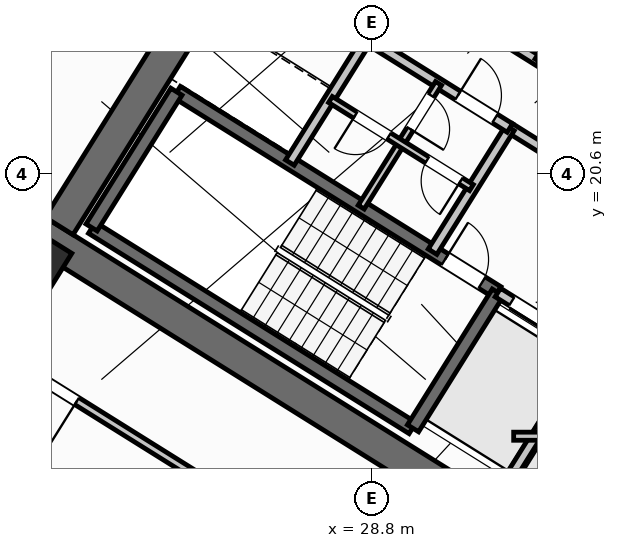
"""IFC4 building model, lengths in metres.
Left out: names, types, materials, properties, quantities, classifications, styles, units other than length and angle.
Written with IfcOpenShell. Run it as: python <this file> out.ifc"""

import sys

from ifc_helpers import new_model, si_unit, direction, frame, frame_2d, origin, origin_2d, place, context, subcontext, project, spatial, rectangle, hollow_rectangle, extrude, source, transform, mapped, element, fill, save


model = new_model("IFC4")
c1 = context("Model", 3, precision=1e-05, world=origin(), true_north=direction((0.0, 1.0)))
c2 = subcontext(c1, "Body", "Model", "MODEL_VIEW")
j1 = project(units=[si_unit("LENGTHUNIT", "METRE"), si_unit("PLANEANGLEUNIT", "RADIAN")], contexts=[c1])
p1 = place(None, origin())
s1 = spatial("IfcSite", under=j1, at=p1, CompositionType="ELEMENT")
p2 = place(p1, origin())
s2 = spatial("IfcBuilding", under=s1, at=p2, CompositionType="ELEMENT")
p3 = place(p2, frame((0.0, 0.0, 45.6)))
s3 = spatial("IfcBuildingStorey", under=s2, at=p3, CompositionType="ELEMENT", Elevation=45.6)
p4 = place(p3, frame((33.409, 12.45, 0.0), z_axis=(0.0, 0.0, 1.0), x_axis=(-0.848051132073, 0.529914405721, 0.0)))
e1 = element("IfcWall", 1, at=p4, inside=s3, PredefinedType="SHEAR", context=c2, shape_type="SweptSolid", body=[
    extrude(rectangle(XDim=13.24, YDim=0.65, at=frame_2d((6.62, 0.0))), origin(), (0.0, 0.0, 1.0), 3.35),
])
p5 = place(p3, frame((26.007, 24.976, 0.0), z_axis=(0.0, 0.0, 1.0), x_axis=(-0.529916319127, -0.848049936456, 0.0)))
e2 = element("IfcWall", 2, at=p5, inside=s3, PredefinedType="SHEAR", context=c2, shape_type="SweptSolid", body=[
    extrude(rectangle(XDim=6.375, YDim=0.65, at=frame_2d((3.188, 0.0))), origin(), (0.0, 0.0, 1.0), 3.35),
])
m1 = source(origin(), c2, "Body", "SweptSolid", [
    extrude(hollow_rectangle(XDim=1.0, YDim=1.0, WallThickness=0.04, at=origin_2d()), origin(), (0.0, 0.0, 1.0), 3.6),
])
p6 = place(p3, frame((22.191, 18.87, 0.0), z_axis=(0.0, 0.0, 1.0), x_axis=(-0.848048096156, 0.529919264233, 0.0)))
e3 = element("IfcColumn", 3, at=p6, inside=s3, PredefinedType="COLUMN", context=c2, shape_type="MappedRepresentation", body=[
    mapped(m1, transform((0.0, 0.0, 0.0), scale=1.0)),
])
p7 = place(p3, frame((29.268, 6.429, 0.0), z_axis=(0.0, 0.0, 1.0), x_axis=(-0.848049971435, 0.529916263149, 0.0)))
e4 = element("IfcWall", 4, at=p7, inside=s3, PredefinedType="STANDARD", context=c2, shape_type="SweptSolid", body=[
    extrude(rectangle(XDim=31.588, YDim=0.32, at=frame_2d((15.794, 0.0))), origin(), (0.0, 0.0, 1.0), 3.35),
])
p8 = place(p7, frame((16.362, 0.0, 0.0)))
e5 = element("IfcOpeningElement", 5, at=p8, cuts=e4, PredefinedType="OPENING", context=c2, shape_type="SweptSolid", body=[
    extrude(rectangle(XDim=1.2, YDim=2.15, at=frame_2d((0.6, 1.075))), frame((0.0, 0.17, 0.0), z_axis=(0.0, -1.0, 0.0), x_axis=(1.0, 0.0, 0.0)), (0.0, 0.0, 1.0), 0.34),
])
p9 = place(p7, frame((2.989, 0.0, 0.8)))
e6 = element("IfcOpeningElement", 6, at=p9, cuts=e4, PredefinedType="OPENING", context=c2, shape_type="SweptSolid", body=[
    extrude(rectangle(XDim=2.1, YDim=1.55, at=frame_2d((1.05, 0.775))), frame((0.0, 0.17, 0.0), z_axis=(0.0, -1.0, 0.0), x_axis=(1.0, 0.0, 0.0)), (0.0, 0.0, 1.0), 0.34),
])
p10 = place(p7, frame((8.359, 0.0, 0.8)))
e7 = element("IfcOpeningElement", 7, at=p10, cuts=e4, PredefinedType="OPENING", context=c2, shape_type="SweptSolid", body=[
    extrude(rectangle(XDim=2.1, YDim=1.55, at=frame_2d((1.05, 0.775))), frame((0.0, 0.17, 0.0), z_axis=(0.0, -1.0, 0.0), x_axis=(1.0, 0.0, 0.0)), (0.0, 0.0, 1.0), 0.34),
])
p11 = place(p7, frame((13.284, 0.0, 0.95)))
e8 = element("IfcOpeningElement", 8, at=p11, cuts=e4, PredefinedType="OPENING", context=c2, shape_type="SweptSolid", body=[
    extrude(rectangle(XDim=1.2, YDim=1.4, at=frame_2d((0.6, 0.7))), frame((0.0, 0.17, 0.0), z_axis=(0.0, -1.0, 0.0), x_axis=(1.0, 0.0, 0.0)), (0.0, 0.0, 1.0), 0.34),
])
p12 = place(p7, frame((20.259, 0.0, 0.95)))
e9 = element("IfcOpeningElement", 9, at=p12, cuts=e4, PredefinedType="OPENING", context=c2, shape_type="SweptSolid", body=[
    extrude(rectangle(XDim=1.2, YDim=1.4, at=frame_2d((0.6, 0.7))), frame((0.0, 0.17, 0.0), z_axis=(0.0, -1.0, 0.0), x_axis=(1.0, 0.0, 0.0)), (0.0, 0.0, 1.0), 0.34),
])
p13 = place(p7, frame((22.929, 0.0, 0.95)))
e10 = element("IfcOpeningElement", 10, at=p13, cuts=e4, PredefinedType="OPENING", context=c2, shape_type="SweptSolid", body=[
    extrude(rectangle(XDim=1.2, YDim=1.4, at=frame_2d((0.6, 0.7))), frame((0.0, 0.17, 0.0), z_axis=(0.0, -1.0, 0.0), x_axis=(1.0, 0.0, 0.0)), (0.0, 0.0, 1.0), 0.34),
])
p14 = place(p7, frame((26.106, 0.0, 0.85)))
e11 = element("IfcOpeningElement", 11, at=p14, cuts=e4, PredefinedType="OPENING", context=c2, shape_type="SweptSolid", body=[
    extrude(rectangle(XDim=1.5, YDim=1.5, at=frame_2d((0.75, 0.75))), frame((0.0, 0.17, 0.0), z_axis=(0.0, -1.0, 0.0), x_axis=(1.0, 0.0, 0.0)), (0.0, 0.0, 1.0), 0.34),
])
p15 = place(p7, frame((29.068, 0.0, 0.85)))
e12 = element("IfcOpeningElement", 12, at=p15, cuts=e4, PredefinedType="OPENING", context=c2, shape_type="SweptSolid", body=[
    extrude(rectangle(XDim=1.8, YDim=1.5, at=frame_2d((0.9, 0.75))), frame((0.0, 0.17, 0.0), z_axis=(0.0, -1.0, 0.0), x_axis=(1.0, 0.0, 0.0)), (0.0, 0.0, 1.0), 0.34),
])
p16 = place(p3, frame((29.605, 15.581, 0.0), z_axis=(0.0, 0.0, 1.0), x_axis=(-0.848036911448, 0.529937163087, 0.0)))
e13 = element("IfcWall", 13, at=p16, inside=s3, PredefinedType="SHEAR", context=c2, shape_type="SweptSolid", body=[
    extrude(rectangle(XDim=7.46, YDim=0.26, at=frame_2d((3.73, 0.0))), origin(), (0.0, 0.0, 1.0), 3.35),
])
p17 = place(p3, frame((31.28, 18.261, 0.0), z_axis=(0.0, 0.0, 1.0), x_axis=(-0.848051618787, 0.529913626805, 0.0)))
e14 = element("IfcWall", 14, at=p17, inside=s3, PredefinedType="SHEAR", context=c2, shape_type="SweptSolid", body=[
    extrude(rectangle(XDim=7.46, YDim=0.26, at=frame_2d((3.73, 0.0))), origin(), (0.0, 0.0, 1.0), 3.35),
])
p18 = place(p17, frame((0.36, 0.0, 0.0)))
e15 = element("IfcOpeningElement", 15, at=p18, cuts=e14, PredefinedType="OPENING", context=c2, shape_type="SweptSolid", body=[
    extrude(rectangle(XDim=0.86, YDim=2.05, at=frame_2d((0.43, 1.025))), frame((0.0, 0.14, 0.0), z_axis=(0.0, -1.0, 0.0), x_axis=(1.0, 0.0, 0.0)), (0.0, 0.0, 1.0), 0.28),
])
p19 = place(p3, frame((31.288, 18.256, 0.0), z_axis=(0.0, 0.0, 1.0), x_axis=(-0.529943379326, -0.848033026897, 0.0)))
e16 = element("IfcWall", 16, at=p19, inside=s3, PredefinedType="SHEAR", context=c2, shape_type="SweptSolid", body=[
    extrude(rectangle(XDim=3.16, YDim=0.26, at=frame_2d((1.58, 0.0))), origin(), (0.0, 0.0, 1.0), 3.35),
])
p20 = place(p3, frame((24.945, 22.22, 0.0), z_axis=(0.0, 0.0, 1.0), x_axis=(-0.529908658664, -0.84805472316, 0.0)))
e17 = element("IfcWall", 17, at=p20, inside=s3, PredefinedType="SHEAR", context=c2, shape_type="SweptSolid", body=[
    extrude(rectangle(XDim=3.16, YDim=0.26, at=frame_2d((1.58, 0.0))), origin(), (0.0, 0.0, 1.0), 3.35),
])
p21 = place(p3, frame((38.046, 21.108, 0.0), z_axis=(0.0, 0.0, 1.0), x_axis=(-0.848054434086, 0.529909121291, 0.0)))
e18 = element("IfcWall", 18, at=p21, inside=s3, PredefinedType="SHEAR", context=c2, shape_type="SweptSolid", body=[
    extrude(rectangle(XDim=7.33, YDim=0.26, at=frame_2d((3.665, 0.0))), origin(), (0.0, 0.0, 1.0), 3.35),
])
p22 = place(p21, frame((0.22, 0.0, 0.0)))
e19 = element("IfcOpeningElement", 19, at=p22, cuts=e18, PredefinedType="OPENING", context=c2, shape_type="SweptSolid", body=[
    extrude(rectangle(XDim=1.1, YDim=2.1, at=frame_2d((0.55, 1.05))), frame((0.0, 0.14, 0.0), z_axis=(0.0, -1.0, 0.0), x_axis=(1.0, 0.0, 0.0)), (0.0, 0.0, 1.0), 0.28),
])
p23 = place(p3, frame((34.848, 16.031, 0.0), z_axis=(0.0, 0.0, 1.0), x_axis=(-0.848044042236, 0.529925751807, 0.0)))
e20 = element("IfcWall", 20, at=p23, inside=s3, PredefinedType="STANDARD", context=c2, shape_type="SweptSolid", body=[
    extrude(rectangle(XDim=4.198, YDim=0.2, at=frame_2d((2.099, 0.0))), origin(), (0.0, 0.0, 1.0), 3.34),
])
p24 = place(p23, frame((0.348, 0.0, 0.0)))
e21 = element("IfcOpeningElement", 21, at=p24, cuts=e20, PredefinedType="OPENING", context=c2, shape_type="SweptSolid", body=[
    extrude(rectangle(XDim=1.3, YDim=2.2, at=frame_2d((0.65, 1.1))), frame((0.0, 0.11, 0.0), z_axis=(0.0, -1.0, 0.0), x_axis=(1.0, 0.0, 0.0)), (0.0, 0.0, 1.0), 0.22),
])
p25 = place(p23, frame((2.423, 0.0, 0.0)))
e22 = element("IfcOpeningElement", 22, at=p25, cuts=e20, PredefinedType="OPENING", context=c2, shape_type="SweptSolid", body=[
    extrude(rectangle(XDim=1.45, YDim=2.25, at=frame_2d((0.725, 1.125))), frame((0.0, 0.11, 0.0), z_axis=(0.0, -1.0, 0.0), x_axis=(1.0, 0.0, 0.0)), (0.0, 0.0, 1.0), 0.22),
])
p26 = place(p3, frame((36.374, 18.474, 0.0), z_axis=(0.0, 0.0, 1.0), x_axis=(-0.848051071577, 0.529914502535, 0.0)))
e23 = element("IfcWall", 23, at=p26, inside=s3, PredefinedType="STANDARD", context=c2, shape_type="SweptSolid", body=[
    extrude(rectangle(XDim=5.718, YDim=0.2, at=frame_2d((2.859, 0.0))), origin(), (0.0, 0.0, 1.0), 3.34),
])
p27 = place(p26, frame((2.498, 0.0, 0.0)))
e24 = element("IfcOpeningElement", 24, at=p27, cuts=e23, PredefinedType="OPENING", context=c2, shape_type="SweptSolid", body=[
    extrude(rectangle(XDim=1.15, YDim=2.1, at=frame_2d((0.575, 1.05))), frame((0.0, 0.11, 0.0), z_axis=(0.0, -1.0, 0.0), x_axis=(1.0, 0.0, 0.0)), (0.0, 0.0, 1.0), 0.22),
])
p28 = place(p3, frame((32.108, 22.814, 0.0), z_axis=(0.0, 0.0, 1.0), x_axis=(-0.848042229521, 0.529928652696, 0.0)))
e25 = element("IfcWall", 25, at=p28, inside=s3, PredefinedType="STANDARD", context=c2, shape_type="SweptSolid", body=[
    extrude(rectangle(XDim=5.62, YDim=0.2, at=frame_2d((2.81, 0.0))), origin(), (0.0, 0.0, 1.0), 3.34),
])
p29 = place(p3, frame((32.982, 24.213, 0.0), z_axis=(0.0, 0.0, 1.0), x_axis=(-0.529839334948, -0.84809803628, 0.0)))
e26 = element("IfcWall", 26, at=p29, inside=s3, PredefinedType="STANDARD", context=c2, shape_type="SweptSolid", body=[
    extrude(rectangle(XDim=1.65, YDim=0.2, at=frame_2d((0.825, 0.0))), origin(), (0.0, 0.0, 1.0), 3.34),
])
p30 = place(p3, frame((33.029, 17.003, 0.0), z_axis=(0.0, 0.0, 1.0), x_axis=(-0.529916267533, -0.848049968695, 0.0)))
e27 = element("IfcWall", 27, at=p30, inside=s3, PredefinedType="STANDARD", context=c2, shape_type="SweptSolid", body=[
    extrude(rectangle(XDim=2.92, YDim=0.2, at=frame_2d((1.46, 0.0))), origin(), (0.0, 0.0, 1.0), 3.34),
])
for number, where, z_axis, x_axis in (
    (28, (31.525, 21.504, 0.0), (0.0, 0.0, 1.0), (-0.53, -0.848, 0.0)),
    (29, (28.71, 23.263, 0.0), (0.0, 0.0, 1.0), (-0.53, -0.848, 0.0)),
):
    element("IfcWall", number, at=place(p3, frame(where, z_axis=z_axis, x_axis=x_axis)), inside=s3, PredefinedType="STANDARD", context=c2, shape_type="SweptSolid", body=[
        extrude(rectangle(XDim=2.88, YDim=0.2, at=frame_2d((1.44, 0.0))), origin(), (0.0, 0.0, 1.0), 3.34),
    ])
p31 = place(p3, frame((31.525, 21.504, 0.0), z_axis=(0.0, 0.0, 1.0), x_axis=(-0.848044998614, 0.529924221305, 0.0)))
e30 = element("IfcWall", 30, at=p31, inside=s3, PredefinedType="STANDARD", context=c2, shape_type="SweptSolid", body=[
    extrude(rectangle(XDim=6.168, YDim=0.2, at=frame_2d((3.084, 0.0))), origin(), (0.0, 0.0, 1.0), 3.34),
])
p32 = place(p31, frame((4.4, 0.0, 0.0)))
e31 = element("IfcOpeningElement", 31, at=p32, cuts=e30, PredefinedType="OPENING", context=c2, shape_type="SweptSolid", body=[
    extrude(rectangle(XDim=0.86, YDim=2.05, at=frame_2d((0.43, 1.025))), frame((0.0, 0.11, 0.0), z_axis=(0.0, -1.0, 0.0), x_axis=(1.0, 0.0, 0.0)), (0.0, 0.0, 1.0), 0.22),
])
p33 = place(p31, frame((0.35, 0.0, 0.0)))
e32 = element("IfcOpeningElement", 32, at=p33, cuts=e30, PredefinedType="OPENING", context=c2, shape_type="SweptSolid", body=[
    extrude(rectangle(XDim=0.86, YDim=2.05, at=frame_2d((0.43, 1.025))), frame((0.0, 0.11, 0.0), z_axis=(0.0, -1.0, 0.0), x_axis=(1.0, 0.0, 0.0)), (0.0, 0.0, 1.0), 0.22),
])
p34 = place(p3, frame((30.117, 22.384, 0.0), z_axis=(0.0, 0.0, 1.0), x_axis=(-0.529951914384, -0.848027693204, 0.0)))
e33 = element("IfcWall", 33, at=p34, inside=s3, PredefinedType="PLUMBINGWALL", context=c2, shape_type="SweptSolid", body=[
    extrude(rectangle(XDim=1.4, YDim=0.14, at=frame_2d((0.7, 0.0))), origin(), (0.0, 0.0, 1.0), 3.34),
])
p35 = place(p34, frame((0.28, 0.0, 0.0)))
e34 = element("IfcOpeningElement", 34, at=p35, cuts=e33, PredefinedType="OPENING", context=c2, shape_type="SweptSolid", body=[
    extrude(rectangle(XDim=0.78, YDim=2.05, at=frame_2d((0.39, 1.025))), frame((0.0, 0.08, 0.0), z_axis=(0.0, -1.0, 0.0), x_axis=(1.0, 0.0, 0.0)), (0.0, 0.0, 1.0), 0.16),
])
p36 = place(p3, frame((29.375, 21.196, 0.0), z_axis=(0.0, 0.0, 1.0), x_axis=(-0.529865479138, -0.848081702443, 0.0)))
e35 = element("IfcWall", 35, at=p36, inside=s3, PredefinedType="PLUMBINGWALL", context=c2, shape_type="SweptSolid", body=[
    extrude(rectangle(XDim=1.48, YDim=0.14, at=frame_2d((0.74, 0.0))), origin(), (0.0, 0.0, 1.0), 3.34),
])
p37 = place(p3, frame((30.766, 20.327, 0.0), z_axis=(0.0, 0.0, 1.0), x_axis=(-0.848052663127, 0.529911955482, 0.0)))
e36 = element("IfcWall", 36, at=p37, inside=s3, PredefinedType="PLUMBINGWALL", context=c2, shape_type="SweptSolid", body=[
    extrude(rectangle(XDim=3.28, YDim=0.14, at=frame_2d((1.64, 0.0))), origin(), (0.0, 0.0, 1.0), 3.34),
])
p38 = place(p37, frame((0.25, 0.0, 0.0)))
e37 = element("IfcOpeningElement", 37, at=p38, cuts=e36, PredefinedType="OPENING", context=c2, shape_type="SweptSolid", body=[
    extrude(rectangle(XDim=0.78, YDim=2.05, at=frame_2d((0.39, 1.025))), frame((0.0, 0.08, 0.0), z_axis=(0.0, -1.0, 0.0), x_axis=(1.0, 0.0, 0.0)), (0.0, 0.0, 1.0), 0.16),
])
p39 = place(p37, frame((1.92, 0.0, 0.0)))
e38 = element("IfcOpeningElement", 38, at=p39, cuts=e36, PredefinedType="OPENING", context=c2, shape_type="SweptSolid", body=[
    extrude(rectangle(XDim=0.78, YDim=2.05, at=frame_2d((0.39, 1.025))), frame((0.0, 0.08, 0.0), z_axis=(0.0, -1.0, 0.0), x_axis=(1.0, 0.0, 0.0)), (0.0, 0.0, 1.0), 0.16),
])
p40 = place(p3, frame((32.164, 10.374, 0.0), z_axis=(0.0, 0.0, 1.0), x_axis=(-0.848044107957, 0.529925646633, 0.0)))
e39 = element("IfcWall", 39, at=p40, inside=s3, PredefinedType="PARTITIONING", context=c2, shape_type="SweptSolid", body=[
    extrude(rectangle(XDim=15.57, YDim=0.16, at=frame_2d((7.785, 0.0))), origin(), (0.0, 0.0, 1.0), 3.34),
])
p41 = place(p40, frame((10.83, 0.0, 0.0)))
e40 = element("IfcOpeningElement", 40, at=p41, cuts=e39, PredefinedType="OPENING", context=c2, shape_type="SweptSolid", body=[
    extrude(rectangle(XDim=1.0, YDim=2.1, at=frame_2d((0.5, 1.05))), frame((0.0, 0.09, 0.0), z_axis=(0.0, -1.0, 0.0), x_axis=(1.0, 0.0, 0.0)), (0.0, 0.0, 1.0), 0.18),
])
p42 = place(p3, frame((29.72, 8.859, 0.0), z_axis=(0.0, 0.0, 1.0), x_axis=(-0.848049134363, 0.529917602752, 0.0)))
e41 = element("IfcWall", 41, at=p42, inside=s3, PredefinedType="PLUMBINGWALL", context=c2, shape_type="SweptSolid", body=[
    extrude(rectangle(XDim=14.3, YDim=0.14, at=frame_2d((7.15, 0.0))), origin(), (0.0, 0.0, 1.0), 3.34),
])
p43 = place(p42, frame((9.57, 0.0, 0.0)))
e42 = element("IfcOpeningElement", 42, at=p43, cuts=e41, PredefinedType="OPENING", context=c2, shape_type="SweptSolid", body=[
    extrude(rectangle(XDim=0.92, YDim=2.08, at=frame_2d((0.46, 1.04))), frame((0.0, 0.08, 0.0), z_axis=(0.0, -1.0, 0.0), x_axis=(1.0, 0.0, 0.0)), (0.0, 0.0, 1.0), 0.16),
])
p44 = place(p3, frame((31.6, 15.42, 0.0), z_axis=(0.0, 0.0, 1.0), x_axis=(1.0, 0.0, 0.0)))
e43 = element("IfcWall", 43, at=p44, inside=s3, PredefinedType="PARTITIONING", context=c2, shape_type="SweptSolid", body=[
    extrude(rectangle(XDim=2.866, YDim=0.16, at=frame_2d((1.433, 0.0))), origin(), (0.0, 0.0, 1.0), 3.34),
])
m2 = source(origin(), c2, "Body", "SweptSolid", [
    extrude(rectangle(XDim=0.86, YDim=2.05, at=frame_2d((0.43, 1.025))), frame((0.0, 0.025, 0.0), z_axis=(0.0, -1.0, 0.0), x_axis=(1.0, 0.0, 0.0)), (0.0, 0.0, 1.0), 0.05),
])
p45 = place(p18, frame((0.86, 0.0, 0.0), z_axis=(0.0, 0.0, 1.0), x_axis=(-1.0, 0.0, 0.0)))
e44 = element("IfcDoor", 44, at=p45, inside=s3, OperationType="SINGLE_SWING_LEFT", PredefinedType="DOOR", context=c2, shape_type="MappedRepresentation", body=[
    mapped(m2, transform((0.0, 0.0, 0.0), scale=1.0)),
])
fill(e15, e44)
m3 = source(origin(), c2, "Body", "SweptSolid", [
    extrude(rectangle(XDim=1.45, YDim=2.25, at=frame_2d((0.725, 1.125))), frame((0.0, 0.025, 0.0), z_axis=(0.0, -1.0, 0.0), x_axis=(1.0, 0.0, 0.0)), (0.0, 0.0, 1.0), 0.05),
])
p46 = place(p25, origin())
e45 = element("IfcDoor", 45, at=p46, inside=s3, OperationType="DOUBLE_DOOR_SLIDING", PredefinedType="DOOR", context=c2, shape_type="MappedRepresentation", body=[
    mapped(m3, transform((0.0, 0.0, 0.0), scale=1.0)),
])
fill(e22, e45)
p47 = place(p33, frame((0.86, 0.0, 0.0), z_axis=(0.0, 0.0, 1.0), x_axis=(-1.0, 0.0, 0.0)))
e46 = element("IfcDoor", 46, at=p47, inside=s3, OperationType="SINGLE_SWING_LEFT", PredefinedType="DOOR", context=c2, shape_type="MappedRepresentation", body=[
    mapped(m2, transform((0.0, 0.0, 0.0), scale=1.0)),
])
fill(e32, e46)
m4 = source(origin(), c2, "Body", "SweptSolid", [
    extrude(rectangle(XDim=0.78, YDim=2.05, at=frame_2d((0.39, 1.025))), frame((0.0, 0.025, 0.0), z_axis=(0.0, -1.0, 0.0), x_axis=(1.0, 0.0, 0.0)), (0.0, 0.0, 1.0), 0.05),
])
p48 = place(p35, origin())
e47 = element("IfcDoor", 47, at=p48, inside=s3, OperationType="SINGLE_SWING_RIGHT", PredefinedType="DOOR", context=c2, shape_type="MappedRepresentation", body=[
    mapped(m4, transform((0.0, 0.0, 0.0), scale=1.0)),
])
fill(e34, e47)
p49 = place(p38, origin())
e48 = element("IfcDoor", 48, at=p49, inside=s3, OperationType="SINGLE_SWING_LEFT", PredefinedType="DOOR", context=c2, shape_type="MappedRepresentation", body=[
    mapped(m4, transform((0.0, 0.0, 0.0), scale=1.0)),
])
fill(e37, e48)
p50 = place(p39, origin())
e49 = element("IfcDoor", 49, at=p50, inside=s3, OperationType="SINGLE_SWING_RIGHT", PredefinedType="DOOR", context=c2, shape_type="MappedRepresentation", body=[
    mapped(m4, transform((0.0, 0.0, 0.0), scale=1.0)),
])
fill(e38, e49)
m5 = source(origin(), c2, "Body", "SweptSolid", [
    extrude(rectangle(XDim=1.0, YDim=2.1, at=frame_2d((0.5, 1.05))), frame((0.0, 0.025, 0.0), z_axis=(0.0, -1.0, 0.0), x_axis=(1.0, 0.0, 0.0)), (0.0, 0.0, 1.0), 0.05),
])
p51 = place(p41, origin())
e50 = element("IfcDoor", 50, at=p51, inside=s3, OperationType="SINGLE_SWING_LEFT", PredefinedType="DOOR", context=c2, shape_type="MappedRepresentation", body=[
    mapped(m5, transform((0.0, 0.0, 0.0), scale=1.0)),
])
fill(e40, e50)
save(model, sys.argv[1])
